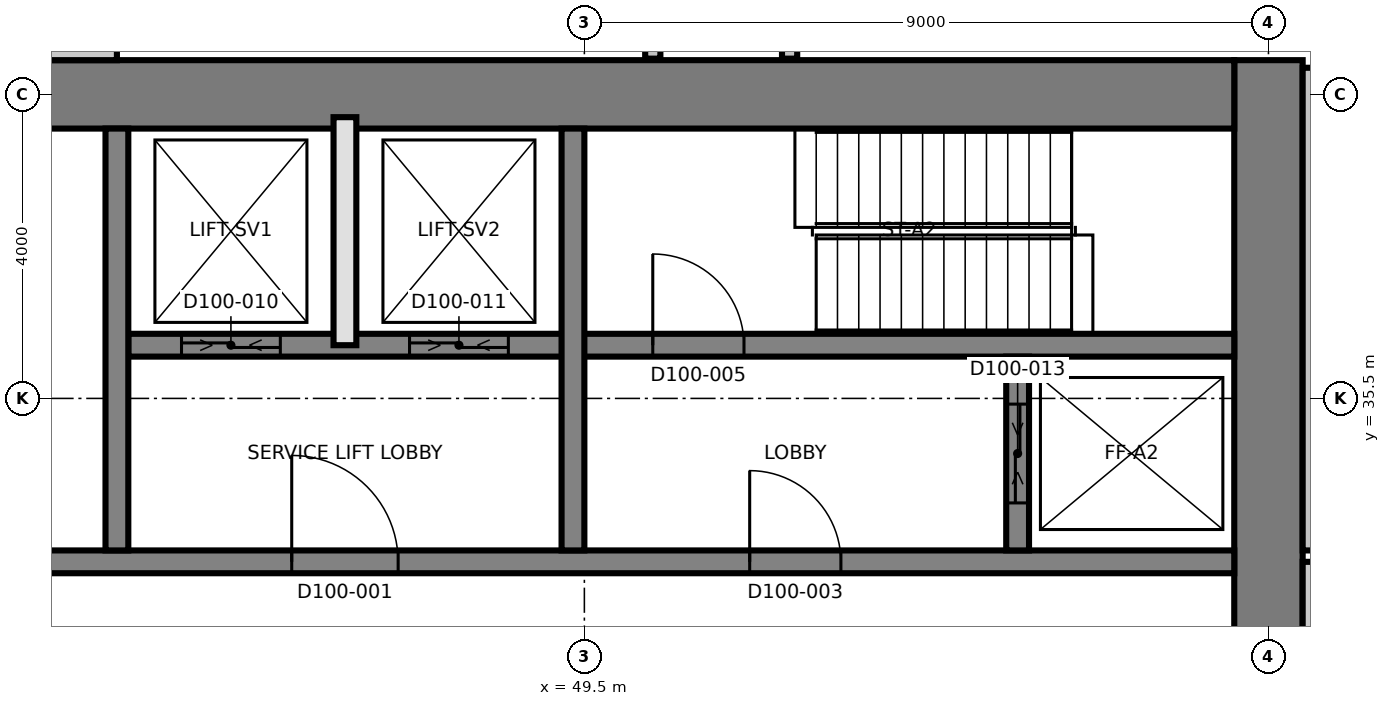
"""IFC4 building model, lengths in metres.
Left out: names, types, materials, properties, quantities, classifications, styles, units other than length and angle.
Written with IfcOpenShell. Run it as: python <this file> out.ifc"""

import sys

from ifc_helpers import new_model, si_unit, direction, frame, frame_2d, origin, place, context, subcontext, project, spatial, rectangle, extrude, element, fill, save


model = new_model("IFC4")
c1 = context("Model", 3, precision=1e-05, world=origin(), true_north=direction((0.0, 1.0)))
c2 = subcontext(c1, "Body", "Model", "MODEL_VIEW")
j1 = project(units=[si_unit("LENGTHUNIT", "METRE"), si_unit("PLANEANGLEUNIT", "RADIAN")], contexts=[c1])
p1 = place(None, origin())
s1 = spatial("IfcSite", under=j1, at=p1, CompositionType="ELEMENT")
p2 = place(p1, origin())
s2 = spatial("IfcBuilding", under=s1, at=p2, CompositionType="ELEMENT")
p3 = place(p2, frame((0.0, 0.0, -9.0)))
s3 = spatial("IfcBuildingStorey", under=s2, at=p3, CompositionType="ELEMENT", Elevation=-9.0)
p4 = place(p3, frame((58.5, 21.05, 0.0), z_axis=(0.0, 0.0, 1.0), x_axis=(0.0, 1.0, 0.0)))
e1 = element("IfcWall", 1, at=p4, inside=s3, PredefinedType="SHEAR", context=c2, shape_type="SweptSolid", body=[
    extrude(rectangle(XDim=18.9, YDim=0.9, at=frame_2d((9.45, 0.0))), origin(), (0.0, 0.0, 1.0), 4.5),
])
p5 = place(p3, frame((31.05, 39.5, 0.0), z_axis=(0.0, 0.0, 1.0), x_axis=(1.0, 0.0, 0.0)))
e2 = element("IfcWall", 2, at=p5, inside=s3, PredefinedType="SHEAR", context=c2, shape_type="SweptSolid", body=[
    extrude(rectangle(XDim=27.0, YDim=0.9, at=frame_2d((13.5, 0.0))), origin(), (0.0, 0.0, 1.0), 4.5),
])
p6 = place(p3, frame((31.95, 33.35, 0.0), z_axis=(0.0, 0.0, 1.0), x_axis=(1.0, 0.0, 0.0)))
e3 = element("IfcWall", 3, at=p6, inside=s3, PredefinedType="SHEAR", context=c2, shape_type="SweptSolid", body=[
    extrude(rectangle(XDim=26.1, YDim=0.3, at=frame_2d((13.05, 0.0))), origin(), (0.0, 0.0, 1.0), 4.5),
])
p7 = place(p6, frame((13.7, 0.0, 0.0)))
e4 = element("IfcOpeningElement", 4, at=p7, cuts=e3, PredefinedType="OPENING", context=c2, shape_type="SweptSolid", body=[
    extrude(rectangle(XDim=1.4, YDim=2.1, at=frame_2d((0.7, 1.05))), frame((0.0, 0.16, 0.0), z_axis=(0.0, -1.0, 0.0), x_axis=(1.0, 0.0, 0.0)), (0.0, 0.0, 1.0), 0.32),
])
p8 = place(p6, frame((5.175, 0.0, 0.0)))
e5 = element("IfcOpeningElement", 5, at=p8, cuts=e3, PredefinedType="OPENING", context=c2, shape_type="SweptSolid", body=[
    extrude(rectangle(XDim=1.2, YDim=2.1, at=frame_2d((0.6, 1.05))), frame((0.0, 0.16, 0.0), z_axis=(0.0, -1.0, 0.0), x_axis=(1.0, 0.0, 0.0)), (0.0, 0.0, 1.0), 0.32),
])
p9 = place(p6, frame((19.725, 0.0, 0.0)))
e6 = element("IfcOpeningElement", 6, at=p9, cuts=e3, PredefinedType="OPENING", context=c2, shape_type="SweptSolid", body=[
    extrude(rectangle(XDim=1.2, YDim=2.1, at=frame_2d((0.6, 1.05))), frame((0.0, 0.16, 0.0), z_axis=(0.0, -1.0, 0.0), x_axis=(1.0, 0.0, 0.0)), (0.0, 0.0, 1.0), 0.32),
])
p10 = place(p3, frame((43.5, 36.2, 0.0), z_axis=(0.0, 0.0, 1.0), x_axis=(1.0, 0.0, 0.0)))
e7 = element("IfcWall", 7, at=p10, inside=s3, PredefinedType="SHEAR", context=c2, shape_type="SweptSolid", body=[
    extrude(rectangle(XDim=14.55, YDim=0.3, at=frame_2d((7.275, 0.0))), origin(), (0.0, 0.0, 1.0), 4.5),
])
p11 = place(p10, frame((6.9, 0.0, 0.0)))
e8 = element("IfcOpeningElement", 8, at=p11, cuts=e7, PredefinedType="OPENING", context=c2, shape_type="SweptSolid", body=[
    extrude(rectangle(XDim=1.2, YDim=2.1, at=frame_2d((0.6, 1.05))), frame((0.0, 0.16, 0.0), z_axis=(0.0, -1.0, 0.0), x_axis=(1.0, 0.0, 0.0)), (0.0, 0.0, 1.0), 0.32),
])
p12 = place(p10, frame((0.7, 0.0, 0.0)))
e9 = element("IfcOpeningElement", 9, at=p12, cuts=e7, PredefinedType="OPENING", context=c2, shape_type="SweptSolid", body=[
    extrude(rectangle(XDim=1.3, YDim=2.4, at=frame_2d((0.65, 1.2))), frame((0.0, 0.16, 0.0), z_axis=(0.0, -1.0, 0.0), x_axis=(1.0, 0.0, 0.0)), (0.0, 0.0, 1.0), 0.32),
])
p13 = place(p10, frame((3.7, 0.0, 0.0)))
e10 = element("IfcOpeningElement", 10, at=p13, cuts=e7, PredefinedType="OPENING", context=c2, shape_type="SweptSolid", body=[
    extrude(rectangle(XDim=1.3, YDim=2.4, at=frame_2d((0.65, 1.2))), frame((0.0, 0.16, 0.0), z_axis=(0.0, -1.0, 0.0), x_axis=(1.0, 0.0, 0.0)), (0.0, 0.0, 1.0), 0.32),
])
for number, where, z_axis, x_axis in (
    (11, (43.35, 33.5, 0.0), (0.0, 0.0, 1.0), (0.0, 1.0, 0.0)),
    (12, (49.35, 33.5, 0.0), (0.0, 0.0, 1.0), (0.0, 1.0, 0.0)),
):
    element("IfcWall", number, at=place(p3, frame(where, z_axis=z_axis, x_axis=x_axis)), inside=s3, PredefinedType="SHEAR", context=c2, shape_type="SweptSolid", body=[
        extrude(rectangle(XDim=5.55, YDim=0.3, at=frame_2d((2.775, 0.0))), origin(), (0.0, 0.0, 1.0), 4.5),
    ])
p14 = place(p3, frame((55.2, 33.5, 0.0), z_axis=(0.0, 0.0, 1.0), x_axis=(0.0, 1.0, 0.0)))
e13 = element("IfcWall", 13, at=p14, inside=s3, PredefinedType="SHEAR", context=c2, shape_type="SweptSolid", body=[
    extrude(rectangle(XDim=2.55, YDim=0.3, at=frame_2d((1.275, 0.0))), origin(), (0.0, 0.0, 1.0), 4.5),
])
p15 = place(p14, frame((0.625, 0.0, 0.0)))
e14 = element("IfcOpeningElement", 14, at=p15, cuts=e13, PredefinedType="OPENING", context=c2, shape_type="SweptSolid", body=[
    extrude(rectangle(XDim=1.3, YDim=2.4, at=frame_2d((0.65, 1.2))), frame((0.0, 0.16, 0.0), z_axis=(0.0, -1.0, 0.0), x_axis=(1.0, 0.0, 0.0)), (0.0, 0.0, 1.0), 0.32),
])
p16 = place(p3, frame((40.65, 40.1, 0.0), z_axis=(0.0, 0.0, 1.0), x_axis=(1.0, 0.0, 0.0)))
e15 = element("IfcWall", 15, at=p16, inside=s3, PredefinedType="PARTITIONING", context=c2, shape_type="SweptSolid", body=[
    extrude(rectangle(XDim=2.7, YDim=0.3, at=frame_2d((1.35, 0.0))), origin(), (0.0, 0.0, 1.0), 4.2),
])
p17 = place(p3, frame((46.35, 36.2, 0.0), z_axis=(0.0, 0.0, 1.0), x_axis=(0.0, 1.0, 0.0)))
e16 = element("IfcWall", 16, at=p17, inside=s3, PredefinedType="SOLIDWALL", context=c2, shape_type="SweptSolid", body=[
    extrude(rectangle(XDim=3.0, YDim=0.3, at=frame_2d((1.5, 0.0))), origin(), (0.0, 0.0, 1.0), 4.2),
])
p18 = place(p3, frame((59.1, 30.65, 0.0), z_axis=(0.0, 0.0, 1.0), x_axis=(0.0, 1.0, 0.0)))
e17 = element("IfcWall", 17, at=p18, inside=s3, PredefinedType="PARTITIONING", context=c2, shape_type="SweptSolid", body=[
    extrude(rectangle(XDim=2.7, YDim=0.3, at=frame_2d((1.35, 0.0))), origin(), (0.0, 0.0, 1.0), 4.2),
])
for number, where, z_axis, x_axis in (
    (18, (50.4, 39.97, 0.0), (0.0, 0.0, 1.0), (0.0, 1.0, 0.0)),
    (19, (52.2, 39.97, 0.0), (0.0, 0.0, 1.0), (0.0, 1.0, 0.0)),
):
    element("IfcWall", number, at=place(p3, frame(where, z_axis=z_axis, x_axis=x_axis)), inside=s3, PredefinedType="PARTITIONING", context=c2, shape_type="SweptSolid", body=[
        extrude(rectangle(XDim=1.96, YDim=0.2, at=frame_2d((0.98, 0.0))), origin(), (0.0, 0.0, 1.0), 4.2),
    ])
p19 = place(p3, frame((59.05, 33.5, 0.0), z_axis=(0.0, 0.0, 1.0), x_axis=(0.0, 1.0, 0.0)))
e20 = element("IfcWall", 20, at=p19, inside=s3, PredefinedType="PARTITIONING", context=c2, shape_type="SweptSolid", body=[
    extrude(rectangle(XDim=6.35, YDim=0.2, at=frame_2d((3.175, 0.0))), origin(), (0.0, 0.0, 1.0), 4.2),
])
p20 = place(p7, origin())
e21 = element("IfcDoor", 21, at=p20, inside=s3, OperationType="SINGLE_SWING_RIGHT", PredefinedType="DOOR", context=c2, shape_type="SweptSolid", body=[
    extrude(rectangle(XDim=1.4, YDim=2.1, at=frame_2d((0.7, 1.05))), frame((0.0, 0.025, 0.0), z_axis=(0.0, -1.0, 0.0), x_axis=(1.0, 0.0, 0.0)), (0.0, 0.0, 1.0), 0.05),
])
fill(e4, e21)
p21 = place(p9, origin())
e22 = element("IfcDoor", 22, at=p21, inside=s3, OperationType="SINGLE_SWING_RIGHT", PredefinedType="DOOR", context=c2, shape_type="SweptSolid", body=[
    extrude(rectangle(XDim=1.2, YDim=2.1, at=frame_2d((0.6, 1.05))), frame((0.0, 0.025, 0.0), z_axis=(0.0, -1.0, 0.0), x_axis=(1.0, 0.0, 0.0)), (0.0, 0.0, 1.0), 0.05),
])
fill(e6, e22)
p22 = place(p11, origin())
e23 = element("IfcDoor", 23, at=p22, inside=s3, OperationType="SINGLE_SWING_LEFT", PredefinedType="DOOR", context=c2, shape_type="SweptSolid", body=[
    extrude(rectangle(XDim=1.2, YDim=2.1, at=frame_2d((0.6, 1.05))), frame((0.0, 0.025, 0.0), z_axis=(0.0, -1.0, 0.0), x_axis=(1.0, 0.0, 0.0)), (0.0, 0.0, 1.0), 0.05),
])
fill(e8, e23)
p23 = place(p12, origin())
e24 = element("IfcDoor", 24, at=p23, inside=s3, OperationType="SLIDING_TO_LEFT", PredefinedType="DOOR", context=c2, shape_type="SweptSolid", body=[
    extrude(rectangle(XDim=1.3, YDim=2.4, at=frame_2d((0.65, 1.2))), frame((0.0, 0.025, 0.0), z_axis=(0.0, -1.0, 0.0), x_axis=(1.0, 0.0, 0.0)), (0.0, 0.0, 1.0), 0.05),
])
fill(e9, e24)
p24 = place(p13, origin())
e25 = element("IfcDoor", 25, at=p24, inside=s3, OperationType="SLIDING_TO_LEFT", PredefinedType="DOOR", context=c2, shape_type="SweptSolid", body=[
    extrude(rectangle(XDim=1.3, YDim=2.4, at=frame_2d((0.65, 1.2))), frame((0.0, 0.025, 0.0), z_axis=(0.0, -1.0, 0.0), x_axis=(1.0, 0.0, 0.0)), (0.0, 0.0, 1.0), 0.05),
])
fill(e10, e25)
p25 = place(p15, origin())
e26 = element("IfcDoor", 26, at=p25, inside=s3, OperationType="SLIDING_TO_LEFT", PredefinedType="DOOR", context=c2, shape_type="SweptSolid", body=[
    extrude(rectangle(XDim=1.3, YDim=2.4, at=frame_2d((0.65, 1.2))), frame((0.0, 0.025, 0.0), z_axis=(0.0, -1.0, 0.0), x_axis=(1.0, 0.0, 0.0)), (0.0, 0.0, 1.0), 0.05),
])
fill(e14, e26)
save(model, sys.argv[1])
